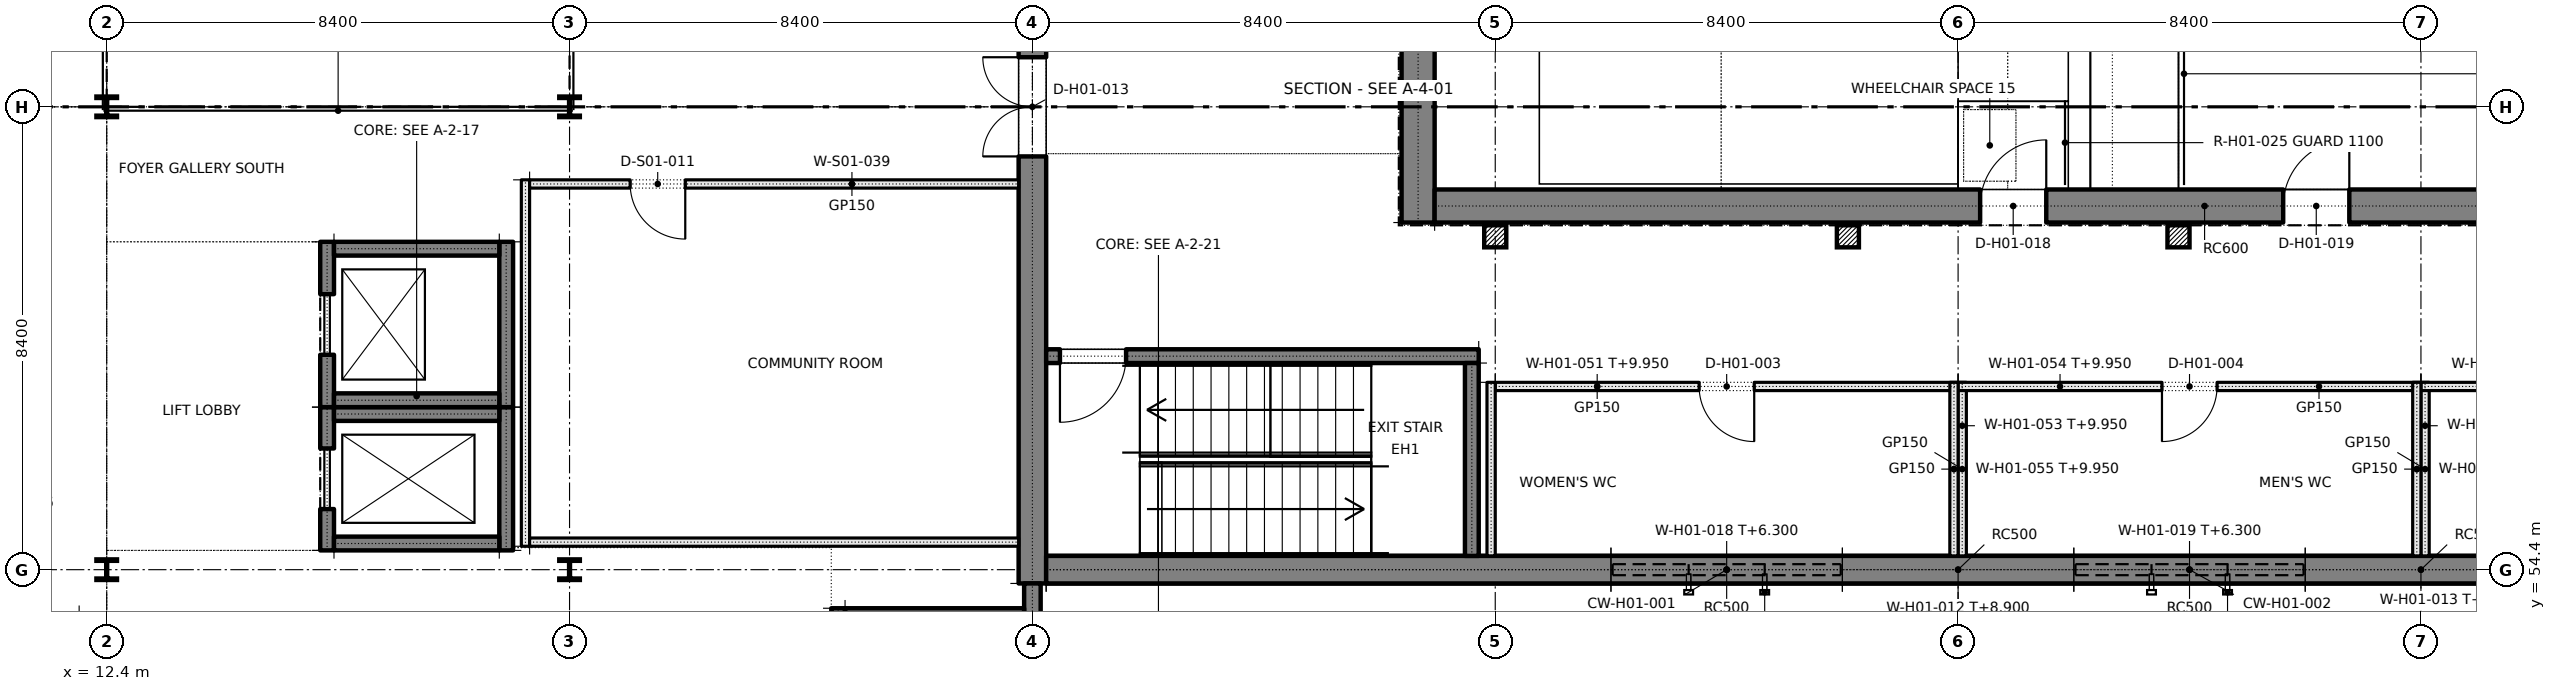
"""IFC4 building model, lengths in metres.
Left out: names, types, materials, properties, quantities, classifications, styles, units other than length and angle.
Written with IfcOpenShell. Run it as: python <this file> out.ifc"""

import sys

from ifc_helpers import new_model, si_unit, direction, frame, frame_2d, origin, origin_2d, place, context, subcontext, project, spatial, rectangle, i_section, extrude, element, fill, save


model = new_model("IFC4")
c1 = context("Model", 3, precision=1e-05, world=origin(), true_north=direction((0.0, 1.0)))
c2 = subcontext(c1, "Body", "Model", "MODEL_VIEW")
j1 = project(units=[si_unit("LENGTHUNIT", "METRE"), si_unit("PLANEANGLEUNIT", "RADIAN")], contexts=[c1])
p1 = place(None, origin())
s1 = spatial("IfcSite", under=j1, at=p1, CompositionType="ELEMENT")
p2 = place(p1, origin())
s2 = spatial("IfcBuilding", under=s1, at=p2, CompositionType="ELEMENT")
p3 = place(p2, frame((0.0, 0.0, 5.4)))
s3 = spatial("IfcBuildingStorey", under=s2, at=p3, CompositionType="ELEMENT", Elevation=5.4)
p4 = place(p3, frame((29.2, 54.15, 0.0), z_axis=(0.0, 0.0, 1.0), x_axis=(0.0, 1.0, 0.0)))
e1 = element("IfcWall", 1, at=p4, inside=s3, PredefinedType="SOLIDWALL", context=c2, shape_type="SweptSolid", body=[
    extrude(rectangle(XDim=42.5, YDim=0.5, at=frame_2d((21.25, 0.0))), origin(), (0.0, 0.0, 1.0), 4.8),
])
p5 = place(p4, frame((7.75, 0.0, 0.0)))
e2 = element("IfcOpeningElement", 2, at=p5, cuts=e1, PredefinedType="OPENING", context=c2, shape_type="SweptSolid", body=[
    extrude(rectangle(XDim=1.8, YDim=2.1, at=frame_2d((0.9, 1.05))), frame((0.0, 0.26, 0.0), z_axis=(0.0, -1.0, 0.0), x_axis=(1.0, 0.0, 0.0)), (0.0, 0.0, 1.0), 0.52),
])
p6 = place(p4, frame((20.35, 0.0, 0.0)))
e3 = element("IfcOpeningElement", 3, at=p6, cuts=e1, PredefinedType="OPENING", context=c2, shape_type="SweptSolid", body=[
    extrude(rectangle(XDim=1.8, YDim=2.1, at=frame_2d((0.9, 1.05))), frame((0.0, 0.26, 0.0), z_axis=(0.0, -1.0, 0.0), x_axis=(1.0, 0.0, 0.0)), (0.0, 0.0, 1.0), 0.52),
])
p7 = place(p4, frame((32.95, 0.0, 0.0)))
e4 = element("IfcOpeningElement", 4, at=p7, cuts=e1, PredefinedType="OPENING", context=c2, shape_type="SweptSolid", body=[
    extrude(rectangle(XDim=1.8, YDim=2.1, at=frame_2d((0.9, 1.05))), frame((0.0, 0.26, 0.0), z_axis=(0.0, -1.0, 0.0), x_axis=(1.0, 0.0, 0.0)), (0.0, 0.0, 1.0), 0.52),
])
p8 = place(p3, frame((29.45, 54.4, 0.0), z_axis=(0.0, 0.0, 1.0), x_axis=(1.0, 0.0, 0.0)))
e5 = element("IfcWall", 5, at=p8, inside=s3, PredefinedType="SOLIDWALL", context=c2, shape_type="SweptSolid", body=[
    extrude(rectangle(XDim=10.25, YDim=0.5, at=frame_2d((5.125, 0.0))), origin(), (0.0, 0.0, 1.0), 3.5),
])
p9 = place(p3, frame((43.9, 54.4, 0.0), z_axis=(0.0, 0.0, 1.0), x_axis=(1.0, 0.0, 0.0)))
e6 = element("IfcWall", 6, at=p9, inside=s3, PredefinedType="SOLIDWALL", context=c2, shape_type="SweptSolid", body=[
    extrude(rectangle(XDim=4.2, YDim=0.5, at=frame_2d((2.1, 0.0))), origin(), (0.0, 0.0, 1.0), 3.5),
])
p10 = place(p3, frame((52.3, 54.4, 0.0), z_axis=(0.0, 0.0, 1.0), x_axis=(1.0, 0.0, 0.0)))
e7 = element("IfcWall", 7, at=p10, inside=s3, PredefinedType="SOLIDWALL", context=c2, shape_type="SweptSolid", body=[
    extrude(rectangle(XDim=4.2, YDim=0.5, at=frame_2d((2.1, 0.0))), origin(), (0.0, 0.0, 1.0), 3.5),
])
for number, where, z_axis, x_axis in (
    (8, (39.7, 54.4, 0.0), (0.0, 0.0, 1.0), (1.0, 0.0, 0.0)),
    (9, (48.1, 54.4, 0.0), (0.0, 0.0, 1.0), (1.0, 0.0, 0.0)),
):
    element("IfcWall", number, at=place(p3, frame(where, z_axis=z_axis, x_axis=x_axis)), inside=s3, PredefinedType="SOLIDWALL", context=c2, shape_type="SweptSolid", body=[
        extrude(rectangle(XDim=4.2, YDim=0.5, at=frame_2d((2.1, 0.0))), origin(), (0.0, 0.0, 1.0), 0.9),
    ])
p11 = place(p3, frame((29.45, 54.4, 3.5), z_axis=(0.0, 0.0, 1.0), x_axis=(1.0, 0.0, 0.0)))
e10 = element("IfcWall", 10, at=p11, inside=s3, PredefinedType="SOLIDWALL", context=c2, shape_type="SweptSolid", body=[
    extrude(rectangle(XDim=66.7, YDim=0.5, at=frame_2d((33.35, 0.0))), origin(), (0.0, 0.0, 1.0), 1.3),
])
p12 = place(p3, frame((36.2, 60.7, 0.0), z_axis=(0.0, 0.0, 1.0), x_axis=(0.0, 1.0, 0.0)))
e11 = element("IfcWall", 11, at=p12, inside=s3, PredefinedType="SOLIDWALL", context=c2, shape_type="SweptSolid", body=[
    extrude(rectangle(XDim=29.4, YDim=0.6, at=frame_2d((14.7, 0.0))), origin(), (0.0, 0.0, 1.0), 4.8),
])
p13 = place(p3, frame((36.5, 61.0, 0.0), z_axis=(0.0, 0.0, 1.0), x_axis=(1.0, 0.0, 0.0)))
e12 = element("IfcWall", 12, at=p13, inside=s3, PredefinedType="SOLIDWALL", context=c2, shape_type="SweptSolid", body=[
    extrude(rectangle(XDim=52.6, YDim=0.6, at=frame_2d((26.3, 0.0))), origin(), (0.0, 0.0, 1.0), 4.8),
])
p14 = place(p13, frame((9.9, 0.0, 0.0)))
e13 = element("IfcOpeningElement", 13, at=p14, cuts=e12, PredefinedType="OPENING", context=c2, shape_type="SweptSolid", body=[
    extrude(rectangle(XDim=1.2, YDim=2.1, at=frame_2d((0.6, 1.05))), frame((0.0, 0.31, 0.0), z_axis=(0.0, -1.0, 0.0), x_axis=(1.0, 0.0, 0.0)), (0.0, 0.0, 1.0), 0.62),
])
p15 = place(p13, frame((15.4, 0.0, 0.0)))
e14 = element("IfcOpeningElement", 14, at=p15, cuts=e12, PredefinedType="OPENING", context=c2, shape_type="SweptSolid", body=[
    extrude(rectangle(XDim=1.2, YDim=2.1, at=frame_2d((0.6, 1.05))), frame((0.0, 0.31, 0.0), z_axis=(0.0, -1.0, 0.0), x_axis=(1.0, 0.0, 0.0)), (0.0, 0.0, 1.0), 0.62),
])
p16 = place(p13, frame((32.4, 0.0, 0.0)))
e15 = element("IfcOpeningElement", 15, at=p16, cuts=e12, PredefinedType="OPENING", context=c2, shape_type="SweptSolid", body=[
    extrude(rectangle(XDim=1.2, YDim=2.1, at=frame_2d((0.6, 1.05))), frame((0.0, 0.31, 0.0), z_axis=(0.0, -1.0, 0.0), x_axis=(1.0, 0.0, 0.0)), (0.0, 0.0, 1.0), 0.62),
])
p17 = place(p3, frame((29.45, 58.275, 0.0), z_axis=(0.0, 0.0, 1.0), x_axis=(1.0, 0.0, 0.0)))
e16 = element("IfcWall", 16, at=p17, inside=s3, PredefinedType="SOLIDWALL", context=c2, shape_type="SweptSolid", body=[
    extrude(rectangle(XDim=7.85, YDim=0.25, at=frame_2d((3.925, 0.0))), origin(), (0.0, 0.0, 1.0), 4.8),
])
p18 = place(p17, frame((0.25, 0.0, 0.0)))
e17 = element("IfcOpeningElement", 17, at=p18, cuts=e16, PredefinedType="OPENING", context=c2, shape_type="SweptSolid", body=[
    extrude(rectangle(XDim=1.2, YDim=2.1, at=frame_2d((0.6, 1.05))), frame((0.0, 0.135, 0.0), z_axis=(0.0, -1.0, 0.0), x_axis=(1.0, 0.0, 0.0)), (0.0, 0.0, 1.0), 0.27),
])
p19 = place(p3, frame((37.175, 54.65, 0.0), z_axis=(0.0, 0.0, 1.0), x_axis=(0.0, 1.0, 0.0)))
e18 = element("IfcWall", 18, at=p19, inside=s3, PredefinedType="SOLIDWALL", context=c2, shape_type="SweptSolid", body=[
    extrude(rectangle(XDim=3.5, YDim=0.25, at=frame_2d((1.75, 0.0))), origin(), (0.0, 0.0, 1.0), 4.8),
])
for number, where, z_axis, x_axis in (
    (19, (37.6, 60.45, 0.0), (0.0, 0.0, 1.0), (1.0, 0.0, 0.0)),
    (20, (44.0, 60.45, 0.0), (0.0, 0.0, 1.0), (1.0, 0.0, 0.0)),
    (21, (50.0, 60.45, 0.0), (0.0, 0.0, 1.0), (1.0, 0.0, 0.0)),
):
    element("IfcColumn", number, at=place(p3, frame(where, z_axis=z_axis, x_axis=x_axis)), inside=s3, PredefinedType="COLUMN", context=c2, shape_type="SweptSolid", body=[
        extrude(rectangle(XDim=0.4, YDim=0.4, at=origin_2d()), origin(), (0.0, 0.0, 1.0), 4.8),
    ])
for number, where, z_axis, x_axis in (
    (22, (12.4, 54.4, 0.0), (0.0, 0.0, 1.0), (1.0, 0.0, 0.0)),
    (23, (12.4, 62.8, 0.0), (0.0, 0.0, 1.0), (1.0, 0.0, 0.0)),
    (24, (20.8, 54.4, 0.0), (0.0, 0.0, 1.0), (1.0, 0.0, 0.0)),
    (25, (20.8, 62.8, 0.0), (0.0, 0.0, 1.0), (1.0, 0.0, 0.0)),
):
    element("IfcColumn", number, at=place(p3, frame(where, z_axis=z_axis, x_axis=x_axis)), inside=s3, PredefinedType="COLUMN", context=c2, shape_type="SweptSolid", body=[
        extrude(i_section(OverallWidth=0.373, OverallDepth=0.373, WebThickness=0.016, FlangeThickness=0.026, FilletRadius=0.015, at=origin_2d()), origin(), (0.0, 0.0, 1.0), 4.8),
    ])
p20 = place(p3, frame((29.2, 46.25, 0.0), z_axis=(0.0, 0.0, 1.0), x_axis=(0.0, 1.0, 0.0)))
e26 = element("IfcWall", 26, at=p20, inside=s3, PredefinedType="SOLIDWALL", context=c2, shape_type="SweptSolid", body=[
    extrude(rectangle(XDim=7.9, YDim=0.3, at=frame_2d((3.95, 0.0))), origin(), (0.0, 0.0, 1.0), 4.8),
])
p21 = place(p3, frame((37.6, 57.725, 0.0), z_axis=(0.0, 0.0, 1.0), x_axis=(1.0, 0.0, 0.0)))
e27 = element("IfcWall", 27, at=p21, inside=s3, PredefinedType="PARTITIONING", context=c2, shape_type="SweptSolid", body=[
    extrude(rectangle(XDim=8.4, YDim=0.15, at=frame_2d((4.2, 0.0))), origin(), (0.0, 0.0, 1.0), 4.55),
])
p22 = place(p21, frame((3.7, 0.0, 0.0)))
e28 = element("IfcOpeningElement", 28, at=p22, cuts=e27, PredefinedType="OPENING", context=c2, shape_type="SweptSolid", body=[
    extrude(rectangle(XDim=1.0, YDim=2.1, at=frame_2d((0.5, 1.05))), frame((0.0, 0.085, 0.0), z_axis=(0.0, -1.0, 0.0), x_axis=(1.0, 0.0, 0.0)), (0.0, 0.0, 1.0), 0.17),
])
p23 = place(p3, frame((37.525, 54.65, 0.0), z_axis=(0.0, 0.0, 1.0), x_axis=(0.0, 1.0, 0.0)))
e29 = element("IfcWall", 29, at=p23, inside=s3, PredefinedType="PARTITIONING", context=c2, shape_type="SweptSolid", body=[
    extrude(rectangle(XDim=3.15, YDim=0.15, at=frame_2d((1.575, 0.0))), origin(), (0.0, 0.0, 1.0), 3.95),
])
p24 = place(p3, frame((46.075, 54.65, 0.0), z_axis=(0.0, 0.0, 1.0), x_axis=(0.0, 1.0, 0.0)))
e30 = element("IfcWall", 30, at=p24, inside=s3, PredefinedType="PARTITIONING", context=c2, shape_type="SweptSolid", body=[
    extrude(rectangle(XDim=3.15, YDim=0.15, at=frame_2d((1.575, 0.0))), origin(), (0.0, 0.0, 1.0), 4.55),
])
p25 = place(p3, frame((46.0, 57.725, 0.0), z_axis=(0.0, 0.0, 1.0), x_axis=(1.0, 0.0, 0.0)))
e31 = element("IfcWall", 31, at=p25, inside=s3, PredefinedType="PARTITIONING", context=c2, shape_type="SweptSolid", body=[
    extrude(rectangle(XDim=8.4, YDim=0.15, at=frame_2d((4.2, 0.0))), origin(), (0.0, 0.0, 1.0), 4.55),
])
p26 = place(p25, frame((3.7, 0.0, 0.0)))
e32 = element("IfcOpeningElement", 32, at=p26, cuts=e31, PredefinedType="OPENING", context=c2, shape_type="SweptSolid", body=[
    extrude(rectangle(XDim=1.0, YDim=2.1, at=frame_2d((0.5, 1.05))), frame((0.0, 0.085, 0.0), z_axis=(0.0, -1.0, 0.0), x_axis=(1.0, 0.0, 0.0)), (0.0, 0.0, 1.0), 0.17),
])
for number, where, z_axis, x_axis in (
    (33, (45.925, 54.65, 0.0), (0.0, 0.0, 1.0), (0.0, 1.0, 0.0)),
    (34, (54.475, 54.65, 0.0), (0.0, 0.0, 1.0), (0.0, 1.0, 0.0)),
):
    element("IfcWall", number, at=place(p3, frame(where, z_axis=z_axis, x_axis=x_axis)), inside=s3, PredefinedType="PARTITIONING", context=c2, shape_type="SweptSolid", body=[
        extrude(rectangle(XDim=3.15, YDim=0.15, at=frame_2d((1.575, 0.0))), origin(), (0.0, 0.0, 1.0), 4.55),
    ])
p27 = place(p3, frame((54.4, 57.725, 0.0), z_axis=(0.0, 0.0, 1.0), x_axis=(1.0, 0.0, 0.0)))
e35 = element("IfcWall", 35, at=p27, inside=s3, PredefinedType="PARTITIONING", context=c2, shape_type="SweptSolid", body=[
    extrude(rectangle(XDim=8.4, YDim=0.15, at=frame_2d((4.2, 0.0))), origin(), (0.0, 0.0, 1.0), 4.55),
])
p28 = place(p27, frame((3.7, 0.0, 0.0)))
e36 = element("IfcOpeningElement", 36, at=p28, cuts=e35, PredefinedType="OPENING", context=c2, shape_type="SweptSolid", body=[
    extrude(rectangle(XDim=1.0, YDim=2.1, at=frame_2d((0.5, 1.05))), frame((0.0, 0.085, 0.0), z_axis=(0.0, -1.0, 0.0), x_axis=(1.0, 0.0, 0.0)), (0.0, 0.0, 1.0), 0.17),
])
p29 = place(p3, frame((54.325, 54.65, 0.0), z_axis=(0.0, 0.0, 1.0), x_axis=(0.0, 1.0, 0.0)))
e37 = element("IfcWall", 37, at=p29, inside=s3, PredefinedType="PARTITIONING", context=c2, shape_type="SweptSolid", body=[
    extrude(rectangle(XDim=3.15, YDim=0.15, at=frame_2d((1.575, 0.0))), origin(), (0.0, 0.0, 1.0), 4.55),
])
p30 = place(p3, frame((25.675, 46.25, 0.0), z_axis=(0.0, 0.0, 1.0), x_axis=(0.0, 1.0, 0.0)))
e38 = element("IfcWall", 38, at=p30, inside=s3, PredefinedType="SHEAR", context=c2, shape_type="SweptSolid", body=[
    extrude(rectangle(XDim=7.45, YDim=0.25, at=frame_2d((3.725, 0.0))), origin(), (0.0, 0.0, 1.0), 4.8),
])
p31 = place(p30, frame((0.15, 0.0, 0.0)))
e39 = element("IfcOpeningElement", 39, at=p31, cuts=e38, PredefinedType="OPENING", context=c2, shape_type="SweptSolid", body=[
    extrude(rectangle(XDim=1.1, YDim=2.1, at=frame_2d((0.55, 1.05))), frame((0.0, 0.135, 0.0), z_axis=(0.0, -1.0, 0.0), x_axis=(1.0, 0.0, 0.0)), (0.0, 0.0, 1.0), 0.27),
])
p32 = place(p3, frame((25.8, 53.575, 0.0), z_axis=(0.0, 0.0, 1.0), x_axis=(1.0, 0.0, 0.0)))
e40 = element("IfcWall", 40, at=p32, inside=s3, PredefinedType="SHEAR", context=c2, shape_type="SweptSolid", body=[
    extrude(rectangle(XDim=3.25, YDim=0.25, at=frame_2d((1.625, 0.0))), origin(), (0.0, 0.0, 1.0), 4.8),
])
p33 = place(p3, frame((16.4, 54.75, 0.0), z_axis=(0.0, 0.0, 1.0), x_axis=(0.0, 1.0, 0.0)))
e41 = element("IfcWall", 41, at=p33, inside=s3, PredefinedType="SOLIDWALL", context=c2, shape_type="SweptSolid", body=[
    extrude(rectangle(XDim=2.6, YDim=0.25, at=frame_2d((1.3, 0.0))), origin(), (0.0, 0.0, 1.0), 4.8),
])
p34 = place(p33, frame((0.75, 0.0, 0.0)))
e42 = element("IfcOpeningElement", 42, at=p34, cuts=e41, PredefinedType="OPENING", context=c2, shape_type="SweptSolid", body=[
    extrude(rectangle(XDim=1.1, YDim=2.1, at=frame_2d((0.55, 1.05))), frame((0.0, 0.135, 0.0), z_axis=(0.0, -1.0, 0.0), x_axis=(1.0, 0.0, 0.0)), (0.0, 0.0, 1.0), 0.27),
])
p35 = place(p3, frame((19.65, 54.75, 0.0), z_axis=(0.0, 0.0, 1.0), x_axis=(0.0, 1.0, 0.0)))
e43 = element("IfcWall", 43, at=p35, inside=s3, PredefinedType="SOLIDWALL", context=c2, shape_type="SweptSolid", body=[
    extrude(rectangle(XDim=2.6, YDim=0.25, at=frame_2d((1.3, 0.0))), origin(), (0.0, 0.0, 1.0), 4.8),
])
for number, where, z_axis, x_axis in (
    (44, (16.525, 54.875, 0.0), (0.0, 0.0, 1.0), (1.0, 0.0, 0.0)),
    (45, (16.525, 57.225, 0.0), (0.0, 0.0, 1.0), (1.0, 0.0, 0.0)),
):
    element("IfcWall", number, at=place(p3, frame(where, z_axis=z_axis, x_axis=x_axis)), inside=s3, PredefinedType="SOLIDWALL", context=c2, shape_type="SweptSolid", body=[
        extrude(rectangle(XDim=3.0, YDim=0.25, at=frame_2d((1.5, 0.0))), origin(), (0.0, 0.0, 1.0), 4.8),
    ])
p36 = place(p3, frame((16.4, 57.35, 0.0), z_axis=(0.0, 0.0, 1.0), x_axis=(0.0, 1.0, 0.0)))
e46 = element("IfcWall", 46, at=p36, inside=s3, PredefinedType="SOLIDWALL", context=c2, shape_type="SweptSolid", body=[
    extrude(rectangle(XDim=3.0, YDim=0.25, at=frame_2d((1.5, 0.0))), origin(), (0.0, 0.0, 1.0), 4.8),
])
p37 = place(p36, frame((0.95, 0.0, 0.0)))
e47 = element("IfcOpeningElement", 47, at=p37, cuts=e46, PredefinedType="OPENING", context=c2, shape_type="SweptSolid", body=[
    extrude(rectangle(XDim=1.1, YDim=2.1, at=frame_2d((0.55, 1.05))), frame((0.0, 0.135, 0.0), z_axis=(0.0, -1.0, 0.0), x_axis=(1.0, 0.0, 0.0)), (0.0, 0.0, 1.0), 0.27),
])
for number, where, z_axis, x_axis in (
    (48, (19.65, 57.35, 0.0), (0.0, 0.0, 1.0), (0.0, 1.0, 0.0)),
    (49, (16.525, 57.475, 0.0), (0.0, 0.0, 1.0), (1.0, 0.0, 0.0)),
    (50, (16.525, 60.225, 0.0), (0.0, 0.0, 1.0), (1.0, 0.0, 0.0)),
):
    element("IfcWall", number, at=place(p3, frame(where, z_axis=z_axis, x_axis=x_axis)), inside=s3, PredefinedType="SOLIDWALL", context=c2, shape_type="SweptSolid", body=[
        extrude(rectangle(XDim=3.0, YDim=0.25, at=frame_2d((1.5, 0.0))), origin(), (0.0, 0.0, 1.0), 4.8),
    ])
p38 = place(p3, frame((20.0, 54.825, 0.0), z_axis=(0.0, 0.0, 1.0), x_axis=(0.0, 1.0, 0.0)))
e51 = element("IfcWall", 51, at=p38, inside=s3, PredefinedType="PARTITIONING", context=c2, shape_type="SweptSolid", body=[
    extrude(rectangle(XDim=6.65, YDim=0.15, at=frame_2d((3.325, 0.0))), origin(), (0.0, 0.0, 1.0), 4.8),
])
p39 = place(p3, frame((20.075, 54.9, 0.0), z_axis=(0.0, 0.0, 1.0), x_axis=(1.0, 0.0, 0.0)))
e52 = element("IfcWall", 52, at=p39, inside=s3, PredefinedType="PARTITIONING", context=c2, shape_type="SweptSolid", body=[
    extrude(rectangle(XDim=8.875, YDim=0.15, at=frame_2d((4.438, 0.0))), origin(), (0.0, 0.0, 1.0), 4.8),
])
p40 = place(p3, frame((20.075, 61.4, 0.0), z_axis=(0.0, 0.0, 1.0), x_axis=(1.0, 0.0, 0.0)))
e53 = element("IfcWall", 53, at=p40, inside=s3, PredefinedType="PARTITIONING", context=c2, shape_type="SweptSolid", body=[
    extrude(rectangle(XDim=8.875, YDim=0.15, at=frame_2d((4.438, 0.0))), origin(), (0.0, 0.0, 1.0), 4.8),
])
p41 = place(p40, frame((1.825, 0.0, 0.0)))
e54 = element("IfcOpeningElement", 54, at=p41, cuts=e53, PredefinedType="OPENING", context=c2, shape_type="SweptSolid", body=[
    extrude(rectangle(XDim=1.0, YDim=2.1, at=frame_2d((0.5, 1.05))), frame((0.0, 0.085, 0.0), z_axis=(0.0, -1.0, 0.0), x_axis=(1.0, 0.0, 0.0)), (0.0, 0.0, 1.0), 0.17),
])
p42 = place(p22, frame((1.0, 0.0, 0.0), z_axis=(0.0, 0.0, 1.0), x_axis=(-1.0, 0.0, 0.0)))
e55 = element("IfcDoor", 55, at=p42, inside=s3, OperationType="SINGLE_SWING_LEFT", PredefinedType="DOOR", context=c2, shape_type="SweptSolid", body=[
    extrude(rectangle(XDim=1.0, YDim=2.1, at=frame_2d((0.5, 1.05))), frame((0.0, 0.025, 0.0), z_axis=(0.0, -1.0, 0.0), x_axis=(1.0, 0.0, 0.0)), (0.0, 0.0, 1.0), 0.05),
])
fill(e28, e55)
p43 = place(p26, frame((1.0, 0.0, 0.0), z_axis=(0.0, 0.0, 1.0), x_axis=(-1.0, 0.0, 0.0)))
e56 = element("IfcDoor", 56, at=p43, inside=s3, OperationType="SINGLE_SWING_RIGHT", PredefinedType="DOOR", context=c2, shape_type="SweptSolid", body=[
    extrude(rectangle(XDim=1.0, YDim=2.1, at=frame_2d((0.5, 1.05))), frame((0.0, 0.025, 0.0), z_axis=(0.0, -1.0, 0.0), x_axis=(1.0, 0.0, 0.0)), (0.0, 0.0, 1.0), 0.05),
])
fill(e32, e56)
p44 = place(p18, frame((1.2, 0.0, 0.0), z_axis=(0.0, 0.0, 1.0), x_axis=(-1.0, 0.0, 0.0)))
e57 = element("IfcDoor", 57, at=p44, inside=s3, OperationType="SINGLE_SWING_RIGHT", PredefinedType="DOOR", context=c2, shape_type="SweptSolid", body=[
    extrude(rectangle(XDim=1.2, YDim=2.1, at=frame_2d((0.6, 1.05))), frame((0.0, 0.025, 0.0), z_axis=(0.0, -1.0, 0.0), x_axis=(1.0, 0.0, 0.0)), (0.0, 0.0, 1.0), 0.05),
])
fill(e17, e57)
p45 = place(p5, origin())
e58 = element("IfcDoor", 58, at=p45, inside=s3, OperationType="DOUBLE_DOOR_SINGLE_SWING", PredefinedType="DOOR", context=c2, shape_type="SweptSolid", body=[
    extrude(rectangle(XDim=1.8, YDim=2.1, at=frame_2d((0.9, 1.05))), frame((0.0, 0.025, 0.0), z_axis=(0.0, -1.0, 0.0), x_axis=(1.0, 0.0, 0.0)), (0.0, 0.0, 1.0), 0.05),
])
fill(e2, e58)
p46 = place(p14, origin())
e59 = element("IfcDoor", 59, at=p46, inside=s3, OperationType="SINGLE_SWING_RIGHT", PredefinedType="DOOR", context=c2, shape_type="SweptSolid", body=[
    extrude(rectangle(XDim=1.2, YDim=2.1, at=frame_2d((0.6, 1.05))), frame((0.0, 0.025, 0.0), z_axis=(0.0, -1.0, 0.0), x_axis=(1.0, 0.0, 0.0)), (0.0, 0.0, 1.0), 0.05),
])
fill(e13, e59)
p47 = place(p15, origin())
e60 = element("IfcDoor", 60, at=p47, inside=s3, OperationType="SINGLE_SWING_RIGHT", PredefinedType="DOOR", context=c2, shape_type="SweptSolid", body=[
    extrude(rectangle(XDim=1.2, YDim=2.1, at=frame_2d((0.6, 1.05))), frame((0.0, 0.025, 0.0), z_axis=(0.0, -1.0, 0.0), x_axis=(1.0, 0.0, 0.0)), (0.0, 0.0, 1.0), 0.05),
])
fill(e14, e60)
p48 = place(p34, origin())
e61 = element("IfcDoor", 61, at=p48, inside=s3, OperationType="SLIDING_TO_LEFT", PredefinedType="DOOR", context=c2, shape_type="SweptSolid", body=[
    extrude(rectangle(XDim=1.1, YDim=2.1, at=frame_2d((0.55, 1.05))), frame((0.0, 0.025, 0.0), z_axis=(0.0, -1.0, 0.0), x_axis=(1.0, 0.0, 0.0)), (0.0, 0.0, 1.0), 0.05),
])
fill(e42, e61)
p49 = place(p37, origin())
e62 = element("IfcDoor", 62, at=p49, inside=s3, OperationType="SLIDING_TO_LEFT", PredefinedType="DOOR", context=c2, shape_type="SweptSolid", body=[
    extrude(rectangle(XDim=1.1, YDim=2.1, at=frame_2d((0.55, 1.05))), frame((0.0, 0.025, 0.0), z_axis=(0.0, -1.0, 0.0), x_axis=(1.0, 0.0, 0.0)), (0.0, 0.0, 1.0), 0.05),
])
fill(e47, e62)
p50 = place(p41, frame((1.0, 0.0, 0.0), z_axis=(0.0, 0.0, 1.0), x_axis=(-1.0, 0.0, 0.0)))
e63 = element("IfcDoor", 63, at=p50, inside=s3, OperationType="SINGLE_SWING_LEFT", PredefinedType="DOOR", context=c2, shape_type="SweptSolid", body=[
    extrude(rectangle(XDim=1.0, YDim=2.1, at=frame_2d((0.5, 1.05))), frame((0.0, 0.025, 0.0), z_axis=(0.0, -1.0, 0.0), x_axis=(1.0, 0.0, 0.0)), (0.0, 0.0, 1.0), 0.05),
])
fill(e54, e63)
save(model, sys.argv[1])
